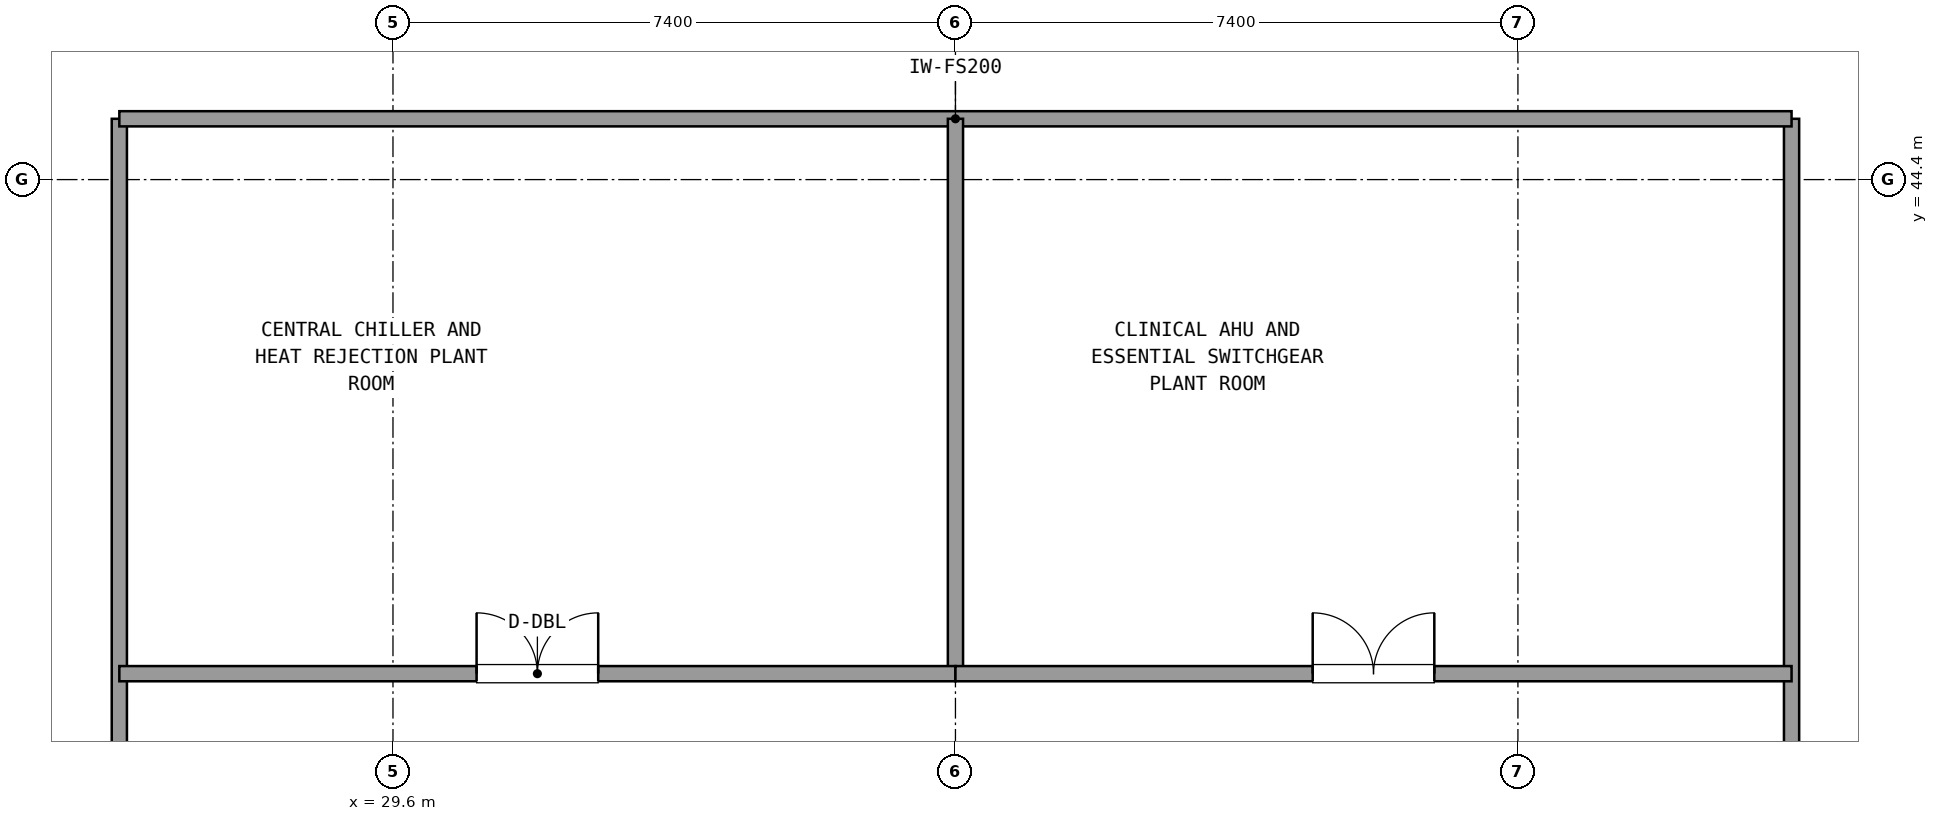
"""IFC4 building model, lengths in metres.
Left out: names, types, materials, properties, quantities, classifications, styles, units other than length and angle.
Written with IfcOpenShell. Run it as: python <this file> out.ifc"""

import sys

from ifc_helpers import new_model, si_unit, direction, frame, frame_2d, origin, place, context, subcontext, project, spatial, rectangle, extrude, element, fill, save


model = new_model("IFC4")
c1 = context("Model", 3, precision=1e-05, world=origin(), true_north=direction((0.0, 1.0)))
c2 = subcontext(c1, "Body", "Model", "MODEL_VIEW")
j1 = project(units=[si_unit("LENGTHUNIT", "METRE"), si_unit("PLANEANGLEUNIT", "RADIAN")], contexts=[c1])
p1 = place(None, origin())
s1 = spatial("IfcSite", under=j1, at=p1, CompositionType="ELEMENT")
p2 = place(p1, origin())
s2 = spatial("IfcBuilding", under=s1, at=p2, CompositionType="ELEMENT")
p3 = place(p2, frame((0.0, 0.0, 70.74)))
s3 = spatial("IfcBuildingStorey", under=s2, at=p3, CompositionType="ELEMENT", Elevation=70.74)
for number, where, z_axis, x_axis in (
    (1, (26.0, 34.8, 0.0), (0.0, 0.0, 1.0), (0.0, 1.0, 0.0)),
    (2, (48.0, 34.8, 0.0), (0.0, 0.0, 1.0), (0.0, 1.0, 0.0)),
):
    element("IfcWall", number, at=place(p3, frame(where, z_axis=z_axis, x_axis=x_axis)), inside=s3, PredefinedType="SOLIDWALL", context=c2, shape_type="SweptSolid", body=[
        extrude(rectangle(XDim=10.4, YDim=0.2, at=frame_2d((5.2, 0.0))), origin(), (0.0, 0.0, 1.0), 2.75),
    ])
p4 = place(p3, frame((26.0, 45.2, 0.0), z_axis=(0.0, 0.0, 1.0), x_axis=(1.0, 0.0, 0.0)))
e3 = element("IfcWall", 3, at=p4, inside=s3, PredefinedType="SOLIDWALL", context=c2, shape_type="SweptSolid", body=[
    extrude(rectangle(XDim=22.0, YDim=0.2, at=frame_2d((11.0, 0.0))), origin(), (0.0, 0.0, 1.0), 2.75),
])
p5 = place(p3, frame((37.0, 37.9, 0.0), z_axis=(0.0, 0.0, 1.0), x_axis=(0.0, 1.0, 0.0)))
e4 = element("IfcWall", 4, at=p5, inside=s3, PredefinedType="SOLIDWALL", context=c2, shape_type="SweptSolid", body=[
    extrude(rectangle(XDim=7.3, YDim=0.2, at=frame_2d((3.65, 0.0))), origin(), (0.0, 0.0, 1.0), 2.75),
])
p6 = place(p3, frame((26.0, 37.9, 0.0), z_axis=(0.0, 0.0, 1.0), x_axis=(1.0, 0.0, 0.0)))
e5 = element("IfcWall", 5, at=p6, inside=s3, PredefinedType="SOLIDWALL", context=c2, shape_type="SweptSolid", body=[
    extrude(rectangle(XDim=11.0, YDim=0.2, at=frame_2d((5.5, 0.0))), origin(), (0.0, 0.0, 1.0), 2.75),
])
p7 = place(p6, frame((4.7, 0.0, 0.0)))
e6 = element("IfcOpeningElement", 6, at=p7, cuts=e5, PredefinedType="OPENING", context=c2, shape_type="SweptSolid", body=[
    extrude(rectangle(XDim=1.6, YDim=2.2, at=frame_2d((0.8, 1.1))), frame((0.0, 0.11, 0.0), z_axis=(0.0, -1.0, 0.0), x_axis=(1.0, 0.0, 0.0)), (0.0, 0.0, 1.0), 0.22),
])
p8 = place(p3, frame((37.0, 37.9, 0.0), z_axis=(0.0, 0.0, 1.0), x_axis=(1.0, 0.0, 0.0)))
e7 = element("IfcWall", 7, at=p8, inside=s3, PredefinedType="SOLIDWALL", context=c2, shape_type="SweptSolid", body=[
    extrude(rectangle(XDim=11.0, YDim=0.2, at=frame_2d((5.5, 0.0))), origin(), (0.0, 0.0, 1.0), 2.75),
])
p9 = place(p8, frame((4.7, 0.0, 0.0)))
e8 = element("IfcOpeningElement", 8, at=p9, cuts=e7, PredefinedType="OPENING", context=c2, shape_type="SweptSolid", body=[
    extrude(rectangle(XDim=1.6, YDim=2.2, at=frame_2d((0.8, 1.1))), frame((0.0, 0.11, 0.0), z_axis=(0.0, -1.0, 0.0), x_axis=(1.0, 0.0, 0.0)), (0.0, 0.0, 1.0), 0.22),
])
p10 = place(p7, origin())
e9 = element("IfcDoor", 9, at=p10, inside=s3, OperationType="DOUBLE_DOOR_SINGLE_SWING", PredefinedType="DOOR", context=c2, shape_type="SweptSolid", body=[
    extrude(rectangle(XDim=1.6, YDim=2.2, at=frame_2d((0.8, 1.1))), frame((0.0, 0.025, 0.0), z_axis=(0.0, -1.0, 0.0), x_axis=(1.0, 0.0, 0.0)), (0.0, 0.0, 1.0), 0.05),
])
fill(e6, e9)
p11 = place(p9, origin())
e10 = element("IfcDoor", 10, at=p11, inside=s3, OperationType="DOUBLE_DOOR_SINGLE_SWING", PredefinedType="DOOR", context=c2, shape_type="SweptSolid", body=[
    extrude(rectangle(XDim=1.6, YDim=2.2, at=frame_2d((0.8, 1.1))), frame((0.0, 0.025, 0.0), z_axis=(0.0, -1.0, 0.0), x_axis=(1.0, 0.0, 0.0)), (0.0, 0.0, 1.0), 0.05),
])
fill(e8, e10)
save(model, sys.argv[1])
